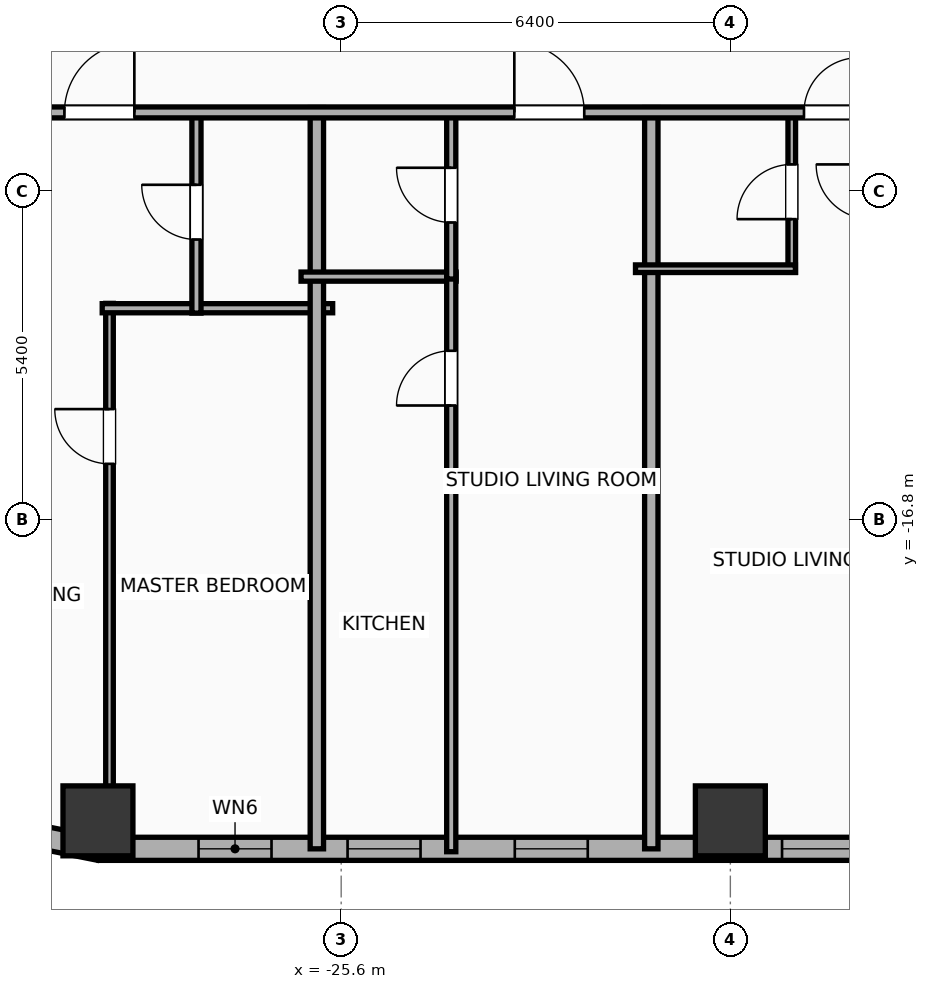
"""IFC4 building model, lengths in metres.
Left out: names, types, materials, properties, quantities, classifications, styles, units other than length and angle.
Written with IfcOpenShell. Run it as: python <this file> out.ifc"""

import sys

from ifc_helpers import new_model, si_unit, direction, frame, frame_2d, origin, origin_2d, place, context, subcontext, project, spatial, rectangle, hollow_rectangle, extrude, element, fill, save


model = new_model("IFC4")
c1 = context("Model", 3, precision=1e-05, world=origin(), true_north=direction((0.0, 1.0)))
c2 = subcontext(c1, "Body", "Model", "MODEL_VIEW")
j1 = project(units=[si_unit("LENGTHUNIT", "METRE"), si_unit("PLANEANGLEUNIT", "RADIAN")], contexts=[c1])
p1 = place(None, origin())
s1 = spatial("IfcSite", under=j1, at=p1, CompositionType="ELEMENT")
p2 = place(p1, origin())
s2 = spatial("IfcBuilding", under=s1, at=p2, CompositionType="ELEMENT")
p3 = place(p2, frame((0.0, 0.0, 68.9)))
s3 = spatial("IfcBuildingStorey", under=s2, at=p3, CompositionType="ELEMENT", Elevation=68.9)
for number, where, z_axis, x_axis in (
    (1, (-29.6, -21.75, 0.0), (0.0, 0.0, 1.0), (1.0, 0.0, 0.0)),
    (2, (-19.2, -21.75, 0.0), (0.0, 0.0, 1.0), (1.0, 0.0, 0.0)),
):
    element("IfcColumn", number, at=place(p3, frame(where, z_axis=z_axis, x_axis=x_axis)), inside=s3, PredefinedType="COLUMN", context=c2, shape_type="SweptSolid", body=[
        extrude(hollow_rectangle(XDim=1.15, YDim=1.15, WallThickness=0.04, at=origin_2d()), origin(), (0.0, 0.0, 1.0), 3.9),
    ])
p4 = place(p3, frame((22.381, -22.21, 0.0), z_axis=(0.0, 0.0, 1.0), x_axis=(-1.0, 0.0, 0.0)))
e3 = element("IfcWall", 3, at=p4, inside=s3, PredefinedType="ELEMENTEDWALL", context=c2, shape_type="SweptSolid", body=[
    extrude(rectangle(XDim=51.963, YDim=0.38, at=frame_2d((25.981, 0.0))), origin(), (0.0, 0.0, 1.0), 3.65),
])
p5 = place(p4, frame((49.127, 0.0, 0.75)))
e4 = element("IfcOpeningElement", 4, at=p5, cuts=e3, PredefinedType="OPENING", context=c2, shape_type="SweptSolid", body=[
    extrude(rectangle(XDim=1.2, YDim=2.05, at=frame_2d((0.6, 1.025))), frame((0.0, 0.2, 0.0), z_axis=(0.0, -1.0, 0.0), x_axis=(1.0, 0.0, 0.0)), (0.0, 0.0, 1.0), 0.4),
])
p6 = place(p4, frame((43.926, 0.0, 0.75)))
e5 = element("IfcOpeningElement", 5, at=p6, cuts=e3, PredefinedType="OPENING", context=c2, shape_type="SweptSolid", body=[
    extrude(rectangle(XDim=1.2, YDim=2.05, at=frame_2d((0.6, 1.025))), frame((0.0, 0.2, 0.0), z_axis=(0.0, -1.0, 0.0), x_axis=(1.0, 0.0, 0.0)), (0.0, 0.0, 1.0), 0.4),
])
p7 = place(p4, frame((46.676, 0.0, 0.75)))
e6 = element("IfcOpeningElement", 6, at=p7, cuts=e3, PredefinedType="OPENING", context=c2, shape_type="SweptSolid", body=[
    extrude(rectangle(XDim=1.2, YDim=2.05, at=frame_2d((0.6, 1.025))), frame((0.0, 0.2, 0.0), z_axis=(0.0, -1.0, 0.0), x_axis=(1.0, 0.0, 0.0)), (0.0, 0.0, 1.0), 0.4),
])
p8 = place(p4, frame((39.531, 0.0, 0.75)))
e7 = element("IfcOpeningElement", 7, at=p8, cuts=e3, PredefinedType="OPENING", context=c2, shape_type="SweptSolid", body=[
    extrude(rectangle(XDim=1.2, YDim=2.05, at=frame_2d((0.6, 1.025))), frame((0.0, 0.2, 0.0), z_axis=(0.0, -1.0, 0.0), x_axis=(1.0, 0.0, 0.0)), (0.0, 0.0, 1.0), 0.4),
])
p9 = place(p4, frame((32.926, 0.0, 0.75)))
e8 = element("IfcOpeningElement", 8, at=p9, cuts=e3, PredefinedType="OPENING", context=c2, shape_type="SweptSolid", body=[
    extrude(rectangle(XDim=1.2, YDim=2.05, at=frame_2d((0.6, 1.025))), frame((0.0, 0.2, 0.0), z_axis=(0.0, -1.0, 0.0), x_axis=(1.0, 0.0, 0.0)), (0.0, 0.0, 1.0), 0.4),
])
p10 = place(p4, frame((35.676, 0.0, 0.75)))
e9 = element("IfcOpeningElement", 9, at=p10, cuts=e3, PredefinedType="OPENING", context=c2, shape_type="SweptSolid", body=[
    extrude(rectangle(XDim=1.2, YDim=2.05, at=frame_2d((0.6, 1.025))), frame((0.0, 0.2, 0.0), z_axis=(0.0, -1.0, 0.0), x_axis=(1.0, 0.0, 0.0)), (0.0, 0.0, 1.0), 0.4),
])
p11 = place(p4, frame((28.531, 0.0, 0.75)))
e10 = element("IfcOpeningElement", 10, at=p11, cuts=e3, PredefinedType="OPENING", context=c2, shape_type="SweptSolid", body=[
    extrude(rectangle(XDim=1.2, YDim=2.05, at=frame_2d((0.6, 1.025))), frame((0.0, 0.2, 0.0), z_axis=(0.0, -1.0, 0.0), x_axis=(1.0, 0.0, 0.0)), (0.0, 0.0, 1.0), 0.4),
])
p12 = place(p4, frame((21.926, 0.0, 0.75)))
e11 = element("IfcOpeningElement", 11, at=p12, cuts=e3, PredefinedType="OPENING", context=c2, shape_type="SweptSolid", body=[
    extrude(rectangle(XDim=1.2, YDim=2.05, at=frame_2d((0.6, 1.025))), frame((0.0, 0.2, 0.0), z_axis=(0.0, -1.0, 0.0), x_axis=(1.0, 0.0, 0.0)), (0.0, 0.0, 1.0), 0.4),
])
p13 = place(p4, frame((24.676, 0.0, 0.75)))
e12 = element("IfcOpeningElement", 12, at=p13, cuts=e3, PredefinedType="OPENING", context=c2, shape_type="SweptSolid", body=[
    extrude(rectangle(XDim=1.2, YDim=2.05, at=frame_2d((0.6, 1.025))), frame((0.0, 0.2, 0.0), z_axis=(0.0, -1.0, 0.0), x_axis=(1.0, 0.0, 0.0)), (0.0, 0.0, 1.0), 0.4),
])
p14 = place(p4, frame((18.636, 0.0, 0.75)))
e13 = element("IfcOpeningElement", 13, at=p14, cuts=e3, PredefinedType="OPENING", context=c2, shape_type="SweptSolid", body=[
    extrude(rectangle(XDim=1.2, YDim=2.05, at=frame_2d((0.6, 1.025))), frame((0.0, 0.2, 0.0), z_axis=(0.0, -1.0, 0.0), x_axis=(1.0, 0.0, 0.0)), (0.0, 0.0, 1.0), 0.4),
])
p15 = place(p4, frame((15.886, 0.0, 0.75)))
e14 = element("IfcOpeningElement", 14, at=p15, cuts=e3, PredefinedType="OPENING", context=c2, shape_type="SweptSolid", body=[
    extrude(rectangle(XDim=1.2, YDim=2.05, at=frame_2d((0.6, 1.025))), frame((0.0, 0.2, 0.0), z_axis=(0.0, -1.0, 0.0), x_axis=(1.0, 0.0, 0.0)), (0.0, 0.0, 1.0), 0.4),
])
p16 = place(p4, frame((12.031, 0.0, 0.75)))
e15 = element("IfcOpeningElement", 15, at=p16, cuts=e3, PredefinedType="OPENING", context=c2, shape_type="SweptSolid", body=[
    extrude(rectangle(XDim=1.2, YDim=2.05, at=frame_2d((0.6, 1.025))), frame((0.0, 0.2, 0.0), z_axis=(0.0, -1.0, 0.0), x_axis=(1.0, 0.0, 0.0)), (0.0, 0.0, 1.0), 0.4),
])
p17 = place(p4, frame((7.636, 0.0, 0.75)))
e16 = element("IfcOpeningElement", 16, at=p17, cuts=e3, PredefinedType="OPENING", context=c2, shape_type="SweptSolid", body=[
    extrude(rectangle(XDim=1.2, YDim=2.05, at=frame_2d((0.6, 1.025))), frame((0.0, 0.2, 0.0), z_axis=(0.0, -1.0, 0.0), x_axis=(1.0, 0.0, 0.0)), (0.0, 0.0, 1.0), 0.4),
])
p18 = place(p4, frame((4.886, 0.0, 0.75)))
e17 = element("IfcOpeningElement", 17, at=p18, cuts=e3, PredefinedType="OPENING", context=c2, shape_type="SweptSolid", body=[
    extrude(rectangle(XDim=1.2, YDim=2.05, at=frame_2d((0.6, 1.025))), frame((0.0, 0.2, 0.0), z_axis=(0.0, -1.0, 0.0), x_axis=(1.0, 0.0, 0.0)), (0.0, 0.0, 1.0), 0.4),
])
p19 = place(p4, frame((2.036, 0.0, 0.75)))
e18 = element("IfcOpeningElement", 18, at=p19, cuts=e3, PredefinedType="OPENING", context=c2, shape_type="SweptSolid", body=[
    extrude(rectangle(XDim=1.2, YDim=2.05, at=frame_2d((0.6, 1.025))), frame((0.0, 0.2, 0.0), z_axis=(0.0, -1.0, 0.0), x_axis=(1.0, 0.0, 0.0)), (0.0, 0.0, 1.0), 0.4),
])
p20 = place(p3, frame((-29.581, -22.21, 0.0), z_axis=(0.0, 0.0, 1.0), x_axis=(-0.980786132421, 0.195086038585, 0.0)))
e19 = element("IfcWall", 19, at=p20, inside=s3, PredefinedType="ELEMENTEDWALL", context=c2, shape_type="SweptSolid", body=[
    extrude(rectangle(XDim=1.504, YDim=0.38, at=frame_2d((0.752, 0.0))), origin(), (0.0, 0.0, 1.0), 3.65),
])
p21 = place(p3, frame((-29.41, -22.36, 0.0), z_axis=(0.0, 0.0, 1.0), x_axis=(0.0, 1.0, 0.0)))
e20 = element("IfcWall", 20, at=p21, inside=s3, PredefinedType="PARTITIONING", context=c2, shape_type="SweptSolid", body=[
    extrude(rectangle(XDim=9.12, YDim=0.125, at=frame_2d((4.56, 0.0))), origin(), (0.0, 0.0, 1.0), 3.65),
])
p22 = place(p21, frame((6.481, 0.0, 0.0)))
e21 = element("IfcOpeningElement", 21, at=p22, cuts=e20, PredefinedType="OPENING", context=c2, shape_type="SweptSolid", body=[
    extrude(rectangle(XDim=0.9, YDim=2.05, at=frame_2d((0.45, 1.025))), frame((0.0, 0.073, 0.0), z_axis=(0.0, -1.0, 0.0), x_axis=(1.0, 0.0, 0.0)), (0.0, 0.0, 1.0), 0.145),
])
p23 = place(p3, frame((-29.53, -13.32, 0.0), z_axis=(0.0, 0.0, 1.0), x_axis=(1.0, 0.0, 0.0)))
e22 = element("IfcWall", 22, at=p23, inside=s3, PredefinedType="PLUMBINGWALL", context=c2, shape_type="SweptSolid", body=[
    extrude(rectangle(XDim=3.79, YDim=0.15, at=frame_2d((1.895, 0.0))), origin(), (0.0, 0.0, 1.0), 3.65),
])
p24 = place(p3, frame((-27.98, -13.4, 0.0), z_axis=(0.0, 0.0, 1.0), x_axis=(0.0, 1.0, 0.0)))
e23 = element("IfcWall", 23, at=p24, inside=s3, PredefinedType="PLUMBINGWALL", context=c2, shape_type="SweptSolid", body=[
    extrude(rectangle(XDim=3.32, YDim=0.15, at=frame_2d((1.66, 0.0))), origin(), (0.0, 0.0, 1.0), 3.65),
])
p25 = place(p24, frame((1.21, 0.0, 0.0)))
e24 = element("IfcOpeningElement", 24, at=p25, cuts=e23, PredefinedType="OPENING", context=c2, shape_type="SweptSolid", body=[
    extrude(rectangle(XDim=0.9, YDim=2.05, at=frame_2d((0.45, 1.025))), frame((0.0, 0.085, 0.0), z_axis=(0.0, -1.0, 0.0), x_axis=(1.0, 0.0, 0.0)), (0.0, 0.0, 1.0), 0.17),
])
p26 = place(p3, frame((-26.0, -22.21, 0.0), z_axis=(0.0, 0.0, 1.0), x_axis=(0.0, 1.0, 0.0)))
e25 = element("IfcWall", 25, at=p26, inside=s3, PredefinedType="PARTITIONING", context=c2, shape_type="SweptSolid", body=[
    extrude(rectangle(XDim=12.19, YDim=0.22, at=frame_2d((6.095, 0.0))), origin(), (0.0, 0.0, 1.0), 3.65),
])
p27 = place(p3, frame((-26.26, -12.8, 0.0), z_axis=(0.0, 0.0, 1.0), x_axis=(1.0, 0.0, 0.0)))
e26 = element("IfcWall", 26, at=p27, inside=s3, PredefinedType="PLUMBINGWALL", context=c2, shape_type="SweptSolid", body=[
    extrude(rectangle(XDim=2.55, YDim=0.15, at=frame_2d((1.275, 0.0))), origin(), (0.0, 0.0, 1.0), 3.65),
])
p28 = place(p3, frame((-23.79, -22.258, 0.0), z_axis=(0.0, 0.0, 1.0), x_axis=(0.0, 1.0, 0.0)))
e27 = element("IfcWall", 27, at=p28, inside=s3, PredefinedType="PLUMBINGWALL", context=c2, shape_type="SweptSolid", body=[
    extrude(rectangle(XDim=9.498, YDim=0.15, at=frame_2d((4.749, 0.0))), origin(), (0.0, 0.0, 1.0), 3.65),
])
p29 = place(p28, frame((7.338, 0.0, 0.0)))
e28 = element("IfcOpeningElement", 28, at=p29, cuts=e27, PredefinedType="OPENING", context=c2, shape_type="SweptSolid", body=[
    extrude(rectangle(XDim=0.9, YDim=2.05, at=frame_2d((0.45, 1.025))), frame((0.0, 0.085, 0.0), z_axis=(0.0, -1.0, 0.0), x_axis=(1.0, 0.0, 0.0)), (0.0, 0.0, 1.0), 0.17),
])
p30 = place(p3, frame((-23.79, -12.84, 0.0), z_axis=(0.0, 0.0, 1.0), x_axis=(0.0, 1.0, 0.0)))
e29 = element("IfcWall", 29, at=p30, inside=s3, PredefinedType="PLUMBINGWALL", context=c2, shape_type="SweptSolid", body=[
    extrude(rectangle(XDim=2.76, YDim=0.15, at=frame_2d((1.38, 0.0))), origin(), (0.0, 0.0, 1.0), 3.65),
])
p31 = place(p30, frame((0.93, 0.0, 0.0)))
e30 = element("IfcOpeningElement", 30, at=p31, cuts=e29, PredefinedType="OPENING", context=c2, shape_type="SweptSolid", body=[
    extrude(rectangle(XDim=0.9, YDim=2.05, at=frame_2d((0.45, 1.025))), frame((0.0, 0.085, 0.0), z_axis=(0.0, -1.0, 0.0), x_axis=(1.0, 0.0, 0.0)), (0.0, 0.0, 1.0), 0.17),
])
p32 = place(p3, frame((-20.5, -22.21, 0.0), z_axis=(0.0, 0.0, 1.0), x_axis=(0.0, 1.0, 0.0)))
e31 = element("IfcWall", 31, at=p32, inside=s3, PredefinedType="PARTITIONING", context=c2, shape_type="SweptSolid", body=[
    extrude(rectangle(XDim=12.19, YDim=0.22, at=frame_2d((6.095, 0.0))), origin(), (0.0, 0.0, 1.0), 3.65),
])
p33 = place(p3, frame((-18.19, -12.73, 0.0), z_axis=(0.0, 0.0, 1.0), x_axis=(0.0, 1.0, 0.0)))
e32 = element("IfcWall", 32, at=p33, inside=s3, PredefinedType="PARTITIONING", context=c2, shape_type="SweptSolid", body=[
    extrude(rectangle(XDim=2.65, YDim=0.125, at=frame_2d((1.325, 0.0))), origin(), (0.0, 0.0, 1.0), 3.65),
])
p34 = place(p33, frame((0.875, 0.0, 0.0)))
e33 = element("IfcOpeningElement", 33, at=p34, cuts=e32, PredefinedType="OPENING", context=c2, shape_type="SweptSolid", body=[
    extrude(rectangle(XDim=0.9, YDim=2.05, at=frame_2d((0.45, 1.025))), frame((0.0, 0.073, 0.0), z_axis=(0.0, -1.0, 0.0), x_axis=(1.0, 0.0, 0.0)), (0.0, 0.0, 1.0), 0.145),
])
p35 = place(p3, frame((-20.76, -12.67, 0.0), z_axis=(0.0, 0.0, 1.0), x_axis=(1.0, 0.0, 0.0)))
e34 = element("IfcWall", 34, at=p35, inside=s3, PredefinedType="PARTITIONING", context=c2, shape_type="SweptSolid", body=[
    extrude(rectangle(XDim=2.63, YDim=0.125, at=frame_2d((1.315, 0.0))), origin(), (0.0, 0.0, 1.0), 3.65),
])
p36 = place(p3, frame((-33.41, -10.1, 0.0), z_axis=(0.0, 0.0, 1.0), x_axis=(1.0, 0.0, 0.0)))
e35 = element("IfcWall", 35, at=p36, inside=s3, PredefinedType="PARTITIONING", context=c2, shape_type="SweptSolid", body=[
    extrude(rectangle(XDim=59.62, YDim=0.18, at=frame_2d((29.81, 0.0))), origin(), (0.0, 0.0, 1.0), 3.65),
])
p37 = place(p36, frame((3.259, 0.0, 0.0)))
e36 = element("IfcOpeningElement", 36, at=p37, cuts=e35, PredefinedType="OPENING", context=c2, shape_type="SweptSolid", body=[
    extrude(rectangle(XDim=1.15, YDim=2.05, at=frame_2d((0.575, 1.025))), frame((0.0, 0.1, 0.0), z_axis=(0.0, -1.0, 0.0), x_axis=(1.0, 0.0, 0.0)), (0.0, 0.0, 1.0), 0.2),
])
p38 = place(p36, frame((10.657, 0.0, 0.0)))
e37 = element("IfcOpeningElement", 37, at=p38, cuts=e35, PredefinedType="OPENING", context=c2, shape_type="SweptSolid", body=[
    extrude(rectangle(XDim=1.15, YDim=2.05, at=frame_2d((0.575, 1.025))), frame((0.0, 0.1, 0.0), z_axis=(0.0, -1.0, 0.0), x_axis=(1.0, 0.0, 0.0)), (0.0, 0.0, 1.0), 0.2),
])
p39 = place(p36, frame((15.421, 0.0, 0.0)))
e38 = element("IfcOpeningElement", 38, at=p39, cuts=e35, PredefinedType="OPENING", context=c2, shape_type="SweptSolid", body=[
    extrude(rectangle(XDim=0.9, YDim=2.05, at=frame_2d((0.45, 1.025))), frame((0.0, 0.1, 0.0), z_axis=(0.0, -1.0, 0.0), x_axis=(1.0, 0.0, 0.0)), (0.0, 0.0, 1.0), 0.2),
])
p40 = place(p36, frame((21.657, 0.0, 0.0)))
e39 = element("IfcOpeningElement", 39, at=p40, cuts=e35, PredefinedType="OPENING", context=c2, shape_type="SweptSolid", body=[
    extrude(rectangle(XDim=1.15, YDim=2.05, at=frame_2d((0.575, 1.025))), frame((0.0, 0.1, 0.0), z_axis=(0.0, -1.0, 0.0), x_axis=(1.0, 0.0, 0.0)), (0.0, 0.0, 1.0), 0.2),
])
p41 = place(p36, frame((26.421, 0.0, 0.0)))
e40 = element("IfcOpeningElement", 40, at=p41, cuts=e35, PredefinedType="OPENING", context=c2, shape_type="SweptSolid", body=[
    extrude(rectangle(XDim=0.9, YDim=2.05, at=frame_2d((0.45, 1.025))), frame((0.0, 0.1, 0.0), z_axis=(0.0, -1.0, 0.0), x_axis=(1.0, 0.0, 0.0)), (0.0, 0.0, 1.0), 0.2),
])
p42 = place(p36, frame((32.657, 0.0, 0.0)))
e41 = element("IfcOpeningElement", 41, at=p42, cuts=e35, PredefinedType="OPENING", context=c2, shape_type="SweptSolid", body=[
    extrude(rectangle(XDim=1.15, YDim=2.05, at=frame_2d((0.575, 1.025))), frame((0.0, 0.1, 0.0), z_axis=(0.0, -1.0, 0.0), x_axis=(1.0, 0.0, 0.0)), (0.0, 0.0, 1.0), 0.2),
])
p43 = place(p36, frame((36.008, 0.0, 0.0)))
e42 = element("IfcOpeningElement", 42, at=p43, cuts=e35, PredefinedType="OPENING", context=c2, shape_type="SweptSolid", body=[
    extrude(rectangle(XDim=1.15, YDim=2.05, at=frame_2d((0.575, 1.025))), frame((0.0, 0.1, 0.0), z_axis=(0.0, -1.0, 0.0), x_axis=(1.0, 0.0, 0.0)), (0.0, 0.0, 1.0), 0.2),
])
p44 = place(p36, frame((42.917, 0.0, 0.0)))
e43 = element("IfcOpeningElement", 43, at=p44, cuts=e35, PredefinedType="OPENING", context=c2, shape_type="SweptSolid", body=[
    extrude(rectangle(XDim=0.9, YDim=2.05, at=frame_2d((0.45, 1.025))), frame((0.0, 0.1, 0.0), z_axis=(0.0, -1.0, 0.0), x_axis=(1.0, 0.0, 0.0)), (0.0, 0.0, 1.0), 0.2),
])
p45 = place(p36, frame((47.008, 0.0, 0.0)))
e44 = element("IfcOpeningElement", 44, at=p45, cuts=e35, PredefinedType="OPENING", context=c2, shape_type="SweptSolid", body=[
    extrude(rectangle(XDim=1.15, YDim=2.05, at=frame_2d((0.575, 1.025))), frame((0.0, 0.1, 0.0), z_axis=(0.0, -1.0, 0.0), x_axis=(1.0, 0.0, 0.0)), (0.0, 0.0, 1.0), 0.2),
])
p46 = place(p36, frame((55.14, 0.0, 0.0)))
e45 = element("IfcOpeningElement", 45, at=p46, cuts=e35, PredefinedType="OPENING", context=c2, shape_type="SweptSolid", body=[
    extrude(rectangle(XDim=1.15, YDim=2.05, at=frame_2d((0.575, 1.025))), frame((0.0, 0.1, 0.0), z_axis=(0.0, -1.0, 0.0), x_axis=(1.0, 0.0, 0.0)), (0.0, 0.0, 1.0), 0.2),
])
p47 = place(p5, origin())
e46 = element("IfcWindow", 46, at=p47, inside=s3, PartitioningType="SINGLE_PANEL", PredefinedType="WINDOW", context=c2, shape_type="SweptSolid", body=[
    extrude(rectangle(XDim=1.2, YDim=2.05, at=frame_2d((0.6, 1.025))), frame((0.0, 0.03, 0.0), z_axis=(0.0, -1.0, 0.0), x_axis=(1.0, 0.0, 0.0)), (0.0, 0.0, 1.0), 0.06),
])
fill(e4, e46)
p48 = place(p6, origin())
e47 = element("IfcWindow", 47, at=p48, inside=s3, PartitioningType="SINGLE_PANEL", PredefinedType="WINDOW", context=c2, shape_type="SweptSolid", body=[
    extrude(rectangle(XDim=1.2, YDim=2.05, at=frame_2d((0.6, 1.025))), frame((0.0, 0.03, 0.0), z_axis=(0.0, -1.0, 0.0), x_axis=(1.0, 0.0, 0.0)), (0.0, 0.0, 1.0), 0.06),
])
fill(e5, e47)
p49 = place(p7, origin())
e48 = element("IfcWindow", 48, at=p49, inside=s3, PartitioningType="SINGLE_PANEL", PredefinedType="WINDOW", context=c2, shape_type="SweptSolid", body=[
    extrude(rectangle(XDim=1.2, YDim=2.05, at=frame_2d((0.6, 1.025))), frame((0.0, 0.03, 0.0), z_axis=(0.0, -1.0, 0.0), x_axis=(1.0, 0.0, 0.0)), (0.0, 0.0, 1.0), 0.06),
])
fill(e6, e48)
p50 = place(p8, origin())
e49 = element("IfcWindow", 49, at=p50, inside=s3, PartitioningType="SINGLE_PANEL", PredefinedType="WINDOW", context=c2, shape_type="SweptSolid", body=[
    extrude(rectangle(XDim=1.2, YDim=2.05, at=frame_2d((0.6, 1.025))), frame((0.0, 0.03, 0.0), z_axis=(0.0, -1.0, 0.0), x_axis=(1.0, 0.0, 0.0)), (0.0, 0.0, 1.0), 0.06),
])
fill(e7, e49)
p51 = place(p22, origin())
e50 = element("IfcDoor", 50, at=p51, inside=s3, OperationType="SINGLE_SWING_RIGHT", PredefinedType="DOOR", context=c2, shape_type="SweptSolid", body=[
    extrude(rectangle(XDim=0.9, YDim=2.05, at=frame_2d((0.45, 1.025))), frame((0.0, 0.025, 0.0), z_axis=(0.0, -1.0, 0.0), x_axis=(1.0, 0.0, 0.0)), (0.0, 0.0, 1.0), 0.05),
])
fill(e21, e50)
p52 = place(p25, origin())
e51 = element("IfcDoor", 51, at=p52, inside=s3, OperationType="SINGLE_SWING_RIGHT", PredefinedType="DOOR", context=c2, shape_type="SweptSolid", body=[
    extrude(rectangle(XDim=0.9, YDim=2.05, at=frame_2d((0.45, 1.025))), frame((0.0, 0.025, 0.0), z_axis=(0.0, -1.0, 0.0), x_axis=(1.0, 0.0, 0.0)), (0.0, 0.0, 1.0), 0.05),
])
fill(e24, e51)
p53 = place(p29, origin())
e52 = element("IfcDoor", 52, at=p53, inside=s3, OperationType="SINGLE_SWING_LEFT", PredefinedType="DOOR", context=c2, shape_type="SweptSolid", body=[
    extrude(rectangle(XDim=0.9, YDim=2.05, at=frame_2d((0.45, 1.025))), frame((0.0, 0.025, 0.0), z_axis=(0.0, -1.0, 0.0), x_axis=(1.0, 0.0, 0.0)), (0.0, 0.0, 1.0), 0.05),
])
fill(e28, e52)
p54 = place(p31, origin())
e53 = element("IfcDoor", 53, at=p54, inside=s3, OperationType="SINGLE_SWING_RIGHT", PredefinedType="DOOR", context=c2, shape_type="SweptSolid", body=[
    extrude(rectangle(XDim=0.9, YDim=2.05, at=frame_2d((0.45, 1.025))), frame((0.0, 0.025, 0.0), z_axis=(0.0, -1.0, 0.0), x_axis=(1.0, 0.0, 0.0)), (0.0, 0.0, 1.0), 0.05),
])
fill(e30, e53)
p55 = place(p34, origin())
e54 = element("IfcDoor", 54, at=p55, inside=s3, OperationType="SINGLE_SWING_LEFT", PredefinedType="DOOR", context=c2, shape_type="SweptSolid", body=[
    extrude(rectangle(XDim=0.9, YDim=2.05, at=frame_2d((0.45, 1.025))), frame((0.0, 0.025, 0.0), z_axis=(0.0, -1.0, 0.0), x_axis=(1.0, 0.0, 0.0)), (0.0, 0.0, 1.0), 0.05),
])
fill(e33, e54)
p56 = place(p37, origin())
e55 = element("IfcDoor", 55, at=p56, inside=s3, OperationType="SINGLE_SWING_RIGHT", PredefinedType="DOOR", context=c2, shape_type="SweptSolid", body=[
    extrude(rectangle(XDim=1.15, YDim=2.05, at=frame_2d((0.575, 1.025))), frame((0.0, 0.025, 0.0), z_axis=(0.0, -1.0, 0.0), x_axis=(1.0, 0.0, 0.0)), (0.0, 0.0, 1.0), 0.05),
])
fill(e36, e55)
p57 = place(p38, origin())
e56 = element("IfcDoor", 56, at=p57, inside=s3, OperationType="SINGLE_SWING_LEFT", PredefinedType="DOOR", context=c2, shape_type="SweptSolid", body=[
    extrude(rectangle(XDim=1.15, YDim=2.05, at=frame_2d((0.575, 1.025))), frame((0.0, 0.025, 0.0), z_axis=(0.0, -1.0, 0.0), x_axis=(1.0, 0.0, 0.0)), (0.0, 0.0, 1.0), 0.05),
])
fill(e37, e56)
p58 = place(p39, origin())
e57 = element("IfcDoor", 57, at=p58, inside=s3, OperationType="SINGLE_SWING_RIGHT", PredefinedType="DOOR", context=c2, shape_type="SweptSolid", body=[
    extrude(rectangle(XDim=0.9, YDim=2.05, at=frame_2d((0.45, 1.025))), frame((0.0, 0.025, 0.0), z_axis=(0.0, -1.0, 0.0), x_axis=(1.0, 0.0, 0.0)), (0.0, 0.0, 1.0), 0.05),
])
fill(e38, e57)
save(model, sys.argv[1])
